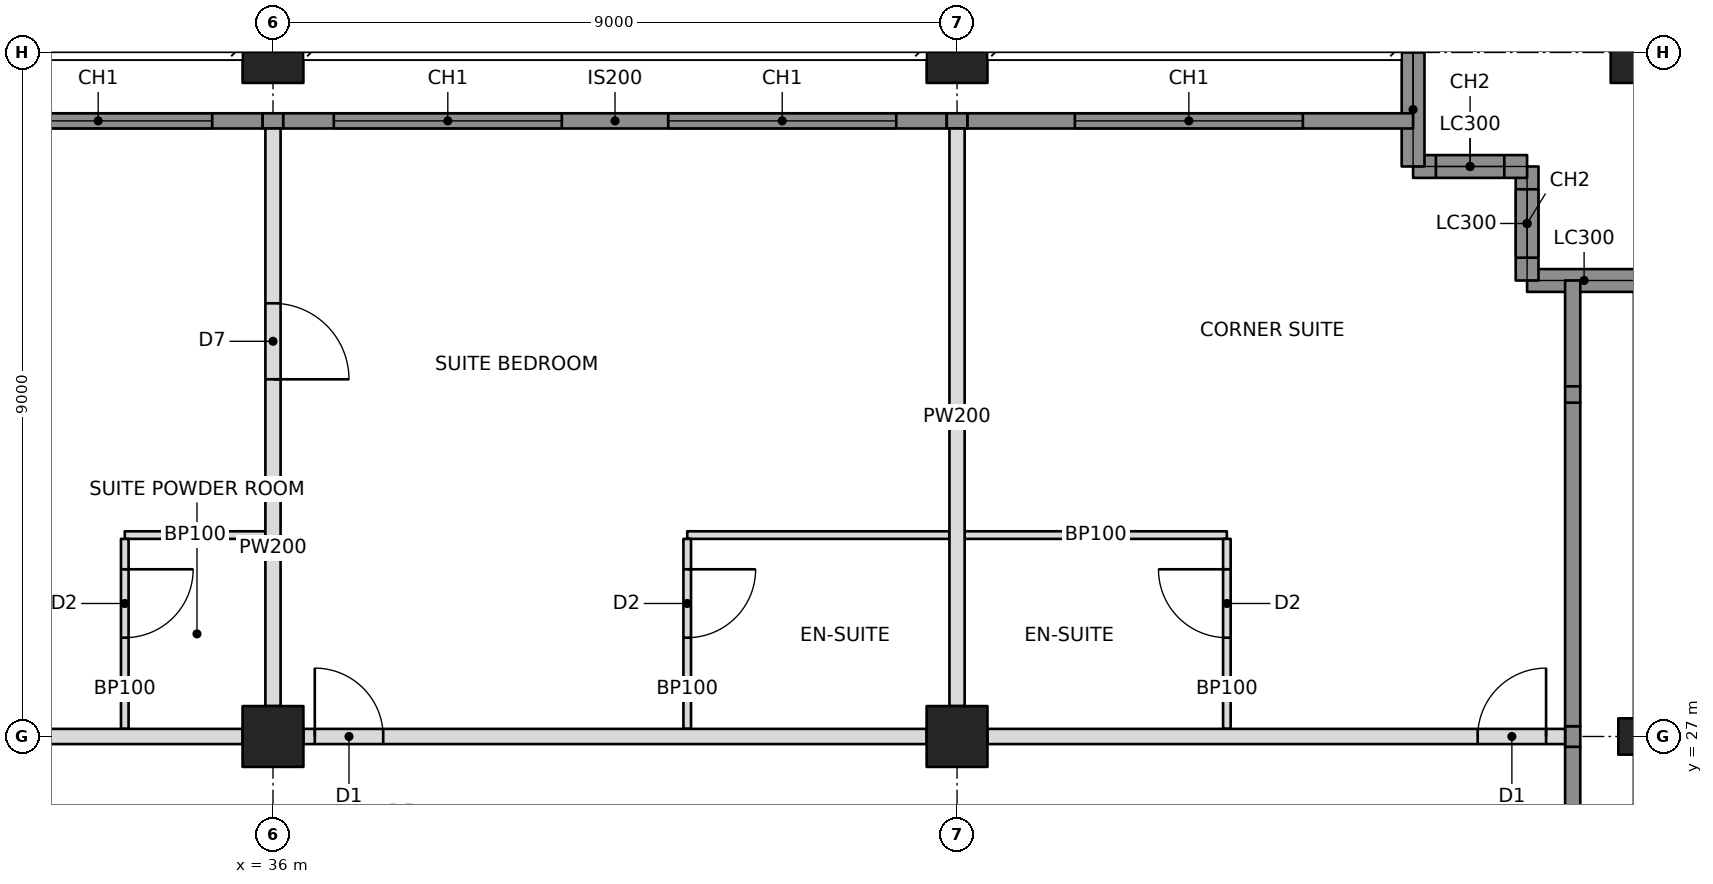
"""IFC4 building model, lengths in metres.
Left out: names, types, materials, properties, quantities, classifications, styles, units other than length and angle.
Written with IfcOpenShell. Run it as: python <this file> out.ifc"""

import sys

from ifc_helpers import new_model, si_unit, direction, frame, frame_2d, origin, origin_2d, place, context, subcontext, project, spatial, rectangle, hollow_rectangle, i_section, extrude, element, fill, save


model = new_model("IFC4")
c1 = context("Model", 3, precision=1e-05, world=origin(), true_north=direction((0.0, 1.0)))
c2 = subcontext(c1, "Body", "Model", "MODEL_VIEW")
j1 = project(units=[si_unit("LENGTHUNIT", "METRE"), si_unit("PLANEANGLEUNIT", "RADIAN")], contexts=[c1])
p1 = place(None, origin())
s1 = spatial("IfcSite", under=j1, at=p1, CompositionType="ELEMENT")
p2 = place(p1, origin())
s2 = spatial("IfcBuilding", under=s1, at=p2, CompositionType="ELEMENT")
p3 = place(p2, frame((0.0, 0.0, 28.0)))
s3 = spatial("IfcBuildingStorey", under=s2, at=p3, CompositionType="ELEMENT", Elevation=28.0)
for number, where, z_axis, x_axis in (
    (1, (36.0, 27.0, 0.0), (0.0, 0.0, 1.0), (1.0, 0.0, 0.0)),
    (2, (36.0, 36.0, 0.0), (0.0, 0.0, 1.0), (1.0, 0.0, 0.0)),
    (3, (45.0, 27.0, 0.0), (0.0, 0.0, 1.0), (0.0, 1.0, 0.0)),
    (4, (45.0, 36.0, 0.0), (0.0, 0.0, 1.0), (1.0, 0.0, 0.0)),
):
    element("IfcColumn", number, at=place(p3, frame(where, z_axis=z_axis, x_axis=x_axis)), inside=s3, PredefinedType="COLUMN", context=c2, shape_type="SweptSolid", body=[
        extrude(hollow_rectangle(XDim=0.8, YDim=0.8, WallThickness=0.1, at=origin_2d()), origin(), (0.0, 0.0, 1.0), 3.4),
    ])
p4 = place(p3, frame((54.0, 27.0, 0.0), z_axis=(0.0, 0.0, 1.0), x_axis=(0.0, 1.0, 0.0)))
e5 = element("IfcColumn", 5, at=p4, inside=s3, PredefinedType="COLUMN", context=c2, shape_type="SweptSolid", body=[
    extrude(i_section(OverallWidth=0.478, OverallDepth=0.599, WebThickness=0.1, FlangeThickness=0.14, at=origin_2d()), origin(), (0.0, 0.0, 1.0), 3.4),
])
p5 = place(p3, frame((54.0, 36.0, 0.0), z_axis=(0.0, 0.0, 1.0), x_axis=(1.0, 0.0, 0.0)))
e6 = element("IfcColumn", 6, at=p5, inside=s3, PredefinedType="COLUMN", context=c2, shape_type="SweptSolid", body=[
    extrude(hollow_rectangle(XDim=0.8, YDim=0.8, WallThickness=0.1, at=origin_2d()), origin(), (0.0, 0.0, 1.0), 3.4),
])
p6 = place(p3, frame((54.0, 33.0, 0.0), z_axis=(0.0, 0.0, 1.0), x_axis=(-1.0, 0.0, 0.0)))
e7 = element("IfcWall", 7, at=p6, inside=s3, PredefinedType="SOLIDWALL", context=c2, shape_type="SweptSolid", body=[
    extrude(rectangle(XDim=1.5, YDim=0.3, at=frame_2d((0.75, 0.0))), origin(), (0.0, 0.0, 1.0), 2.42),
])
p7 = place(p3, frame((52.5, 33.0, 0.0), z_axis=(0.0, 0.0, 1.0), x_axis=(0.0, 1.0, 0.0)))
e8 = element("IfcWall", 8, at=p7, inside=s3, PredefinedType="SOLIDWALL", context=c2, shape_type="SweptSolid", body=[
    extrude(rectangle(XDim=1.5, YDim=0.3, at=frame_2d((0.75, 0.0))), origin(), (0.0, 0.0, 1.0), 3.2),
])
p8 = place(p7, frame((0.3, 0.0, 0.6)))
e9 = element("IfcOpeningElement", 9, at=p8, cuts=e8, PredefinedType="OPENING", context=c2, shape_type="SweptSolid", body=[
    extrude(rectangle(XDim=0.9, YDim=2.2, at=frame_2d((0.45, 1.1))), frame((0.0, 0.16, 0.0), z_axis=(0.0, -1.0, 0.0), x_axis=(1.0, 0.0, 0.0)), (0.0, 0.0, 1.0), 0.32),
])
p9 = place(p3, frame((52.5, 34.5, 0.0), z_axis=(0.0, 0.0, 1.0), x_axis=(-1.0, 0.0, 0.0)))
e10 = element("IfcWall", 10, at=p9, inside=s3, PredefinedType="SOLIDWALL", context=c2, shape_type="SweptSolid", body=[
    extrude(rectangle(XDim=1.5, YDim=0.3, at=frame_2d((0.75, 0.0))), origin(), (0.0, 0.0, 1.0), 3.2),
])
p10 = place(p9, frame((0.3, 0.0, 0.6)))
e11 = element("IfcOpeningElement", 11, at=p10, cuts=e10, PredefinedType="OPENING", context=c2, shape_type="SweptSolid", body=[
    extrude(rectangle(XDim=0.9, YDim=2.2, at=frame_2d((0.45, 1.1))), frame((0.0, 0.16, 0.0), z_axis=(0.0, -1.0, 0.0), x_axis=(1.0, 0.0, 0.0)), (0.0, 0.0, 1.0), 0.32),
])
p11 = place(p3, frame((51.0, 34.5, 0.0), z_axis=(0.0, 0.0, 1.0), x_axis=(0.0, 1.0, 0.0)))
e12 = element("IfcWall", 12, at=p11, inside=s3, PredefinedType="SOLIDWALL", context=c2, shape_type="SweptSolid", body=[
    extrude(rectangle(XDim=1.5, YDim=0.3, at=frame_2d((0.75, 0.0))), origin(), (0.0, 0.0, 1.0), 2.42),
])
p12 = place(p3, frame((27.4, 27.0, 0.0), z_axis=(0.0, 0.0, 1.0), x_axis=(1.0, 0.0, 0.0)))
e13 = element("IfcWall", 13, at=p12, inside=s3, PredefinedType="PARTITIONING", context=c2, shape_type="SweptSolid", body=[
    extrude(rectangle(XDim=8.2, YDim=0.2, at=frame_2d((4.1, 0.0))), origin(), (0.0, 0.0, 1.0), 2.405),
])
p13 = place(p12, frame((0.15, 0.0, 0.0)))
e14 = element("IfcOpeningElement", 14, at=p13, cuts=e13, PredefinedType="OPENING", context=c2, shape_type="SweptSolid", body=[
    extrude(rectangle(XDim=0.9, YDim=2.1, at=frame_2d((0.45, 1.05))), frame((0.0, 0.11, 0.0), z_axis=(0.0, -1.0, 0.0), x_axis=(1.0, 0.0, 0.0)), (0.0, 0.0, 1.0), 0.22),
])
p14 = place(p3, frame((36.4, 27.0, 0.0), z_axis=(0.0, 0.0, 1.0), x_axis=(1.0, 0.0, 0.0)))
e15 = element("IfcWall", 15, at=p14, inside=s3, PredefinedType="PARTITIONING", context=c2, shape_type="SweptSolid", body=[
    extrude(rectangle(XDim=8.2, YDim=0.2, at=frame_2d((4.1, 0.0))), origin(), (0.0, 0.0, 1.0), 2.438),
])
p15 = place(p14, frame((0.15, 0.0, 0.0)))
e16 = element("IfcOpeningElement", 16, at=p15, cuts=e15, PredefinedType="OPENING", context=c2, shape_type="SweptSolid", body=[
    extrude(rectangle(XDim=0.9, YDim=2.1, at=frame_2d((0.45, 1.05))), frame((0.0, 0.11, 0.0), z_axis=(0.0, -1.0, 0.0), x_axis=(1.0, 0.0, 0.0)), (0.0, 0.0, 1.0), 0.22),
])
p16 = place(p3, frame((45.4, 27.0, 0.0), z_axis=(0.0, 0.0, 1.0), x_axis=(1.0, 0.0, 0.0)))
e17 = element("IfcWall", 17, at=p16, inside=s3, PredefinedType="PARTITIONING", context=c2, shape_type="SweptSolid", body=[
    extrude(rectangle(XDim=7.6, YDim=0.2, at=frame_2d((3.8, 0.0))), origin(), (0.0, 0.0, 1.0), 2.438),
])
p17 = place(p16, frame((6.45, 0.0, 0.0)))
e18 = element("IfcOpeningElement", 18, at=p17, cuts=e17, PredefinedType="OPENING", context=c2, shape_type="SweptSolid", body=[
    extrude(rectangle(XDim=0.9, YDim=2.1, at=frame_2d((0.45, 1.05))), frame((0.0, 0.11, 0.0), z_axis=(0.0, -1.0, 0.0), x_axis=(1.0, 0.0, 0.0)), (0.0, 0.0, 1.0), 0.22),
])
p18 = place(p3, frame((36.0, 27.4, 0.0), z_axis=(0.0, 0.0, 1.0), x_axis=(0.0, 1.0, 0.0)))
e19 = element("IfcWall", 19, at=p18, inside=s3, PredefinedType="PARTITIONING", context=c2, shape_type="SweptSolid", body=[
    extrude(rectangle(XDim=7.6, YDim=0.2, at=frame_2d((3.8, 0.0))), origin(), (0.0, 0.0, 1.0), 2.438),
])
p19 = place(p18, frame((4.3, 0.0, 0.0)))
e20 = element("IfcOpeningElement", 20, at=p19, cuts=e19, PredefinedType="OPENING", context=c2, shape_type="SweptSolid", body=[
    extrude(rectangle(XDim=1.0, YDim=2.1, at=frame_2d((0.5, 1.05))), frame((0.0, 0.11, 0.0), z_axis=(0.0, -1.0, 0.0), x_axis=(1.0, 0.0, 0.0)), (0.0, 0.0, 1.0), 0.22),
])
p20 = place(p3, frame((45.0, 27.4, 0.0), z_axis=(0.0, 0.0, 1.0), x_axis=(0.0, 1.0, 0.0)))
e21 = element("IfcWall", 21, at=p20, inside=s3, PredefinedType="PARTITIONING", context=c2, shape_type="SweptSolid", body=[
    extrude(rectangle(XDim=7.6, YDim=0.2, at=frame_2d((3.8, 0.0))), origin(), (0.0, 0.0, 1.0), 2.438),
])
p21 = place(p3, frame((34.05, 29.65, 0.0), z_axis=(0.0, 0.0, 1.0), x_axis=(1.0, 0.0, 0.0)))
e22 = element("IfcWall", 22, at=p21, inside=s3, PredefinedType="PARTITIONING", context=c2, shape_type="SweptSolid", body=[
    extrude(rectangle(XDim=1.85, YDim=0.1, at=frame_2d((0.925, 0.0))), origin(), (0.0, 0.0, 1.0), 2.438),
])
p22 = place(p3, frame((34.05, 27.1, 0.0), z_axis=(0.0, 0.0, 1.0), x_axis=(0.0, 1.0, 0.0)))
e23 = element("IfcWall", 23, at=p22, inside=s3, PredefinedType="PARTITIONING", context=c2, shape_type="SweptSolid", body=[
    extrude(rectangle(XDim=2.5, YDim=0.1, at=frame_2d((1.25, 0.0))), origin(), (0.0, 0.0, 1.0), 2.404),
])
p23 = place(p22, frame((1.2, 0.0, 0.0)))
e24 = element("IfcOpeningElement", 24, at=p23, cuts=e23, PredefinedType="OPENING", context=c2, shape_type="SweptSolid", body=[
    extrude(rectangle(XDim=0.9, YDim=2.1, at=frame_2d((0.45, 1.05))), frame((0.0, 0.06, 0.0), z_axis=(0.0, -1.0, 0.0), x_axis=(1.0, 0.0, 0.0)), (0.0, 0.0, 1.0), 0.12),
])
p24 = place(p3, frame((41.45, 29.65, 0.0), z_axis=(0.0, 0.0, 1.0), x_axis=(1.0, 0.0, 0.0)))
e25 = element("IfcWall", 25, at=p24, inside=s3, PredefinedType="PARTITIONING", context=c2, shape_type="SweptSolid", body=[
    extrude(rectangle(XDim=3.45, YDim=0.1, at=frame_2d((1.725, 0.0))), origin(), (0.0, 0.0, 1.0), 2.438),
])
p25 = place(p3, frame((41.45, 27.1, 0.0), z_axis=(0.0, 0.0, 1.0), x_axis=(0.0, 1.0, 0.0)))
e26 = element("IfcWall", 26, at=p25, inside=s3, PredefinedType="PARTITIONING", context=c2, shape_type="SweptSolid", body=[
    extrude(rectangle(XDim=2.5, YDim=0.1, at=frame_2d((1.25, 0.0))), origin(), (0.0, 0.0, 1.0), 2.438),
])
p26 = place(p25, frame((1.2, 0.0, 0.0)))
e27 = element("IfcOpeningElement", 27, at=p26, cuts=e26, PredefinedType="OPENING", context=c2, shape_type="SweptSolid", body=[
    extrude(rectangle(XDim=0.9, YDim=2.1, at=frame_2d((0.45, 1.05))), frame((0.0, 0.06, 0.0), z_axis=(0.0, -1.0, 0.0), x_axis=(1.0, 0.0, 0.0)), (0.0, 0.0, 1.0), 0.12),
])
p27 = place(p3, frame((45.1, 29.65, 0.0), z_axis=(0.0, 0.0, 1.0), x_axis=(1.0, 0.0, 0.0)))
e28 = element("IfcWall", 28, at=p27, inside=s3, PredefinedType="PARTITIONING", context=c2, shape_type="SweptSolid", body=[
    extrude(rectangle(XDim=3.45, YDim=0.1, at=frame_2d((1.725, 0.0))), origin(), (0.0, 0.0, 1.0), 2.438),
])
p28 = place(p3, frame((48.55, 27.1, 0.0), z_axis=(0.0, 0.0, 1.0), x_axis=(0.0, 1.0, 0.0)))
e29 = element("IfcWall", 29, at=p28, inside=s3, PredefinedType="PARTITIONING", context=c2, shape_type="SweptSolid", body=[
    extrude(rectangle(XDim=2.5, YDim=0.1, at=frame_2d((1.25, 0.0))), origin(), (0.0, 0.0, 1.0), 2.438),
])
p29 = place(p28, frame((1.2, 0.0, 0.0)))
e30 = element("IfcOpeningElement", 30, at=p29, cuts=e29, PredefinedType="OPENING", context=c2, shape_type="SweptSolid", body=[
    extrude(rectangle(XDim=0.9, YDim=2.1, at=frame_2d((0.45, 1.05))), frame((0.0, 0.06, 0.0), z_axis=(0.0, -1.0, 0.0), x_axis=(1.0, 0.0, 0.0)), (0.0, 0.0, 1.0), 0.12),
])
p30 = place(p3, frame((27.194, 35.1, 0.0), z_axis=(0.0, 0.0, 1.0), x_axis=(1.0, 0.0, 0.0)))
e31 = element("IfcWall", 31, at=p30, inside=s3, PredefinedType="SOLIDWALL", context=c2, shape_type="SweptSolid", body=[
    extrude(rectangle(XDim=8.671, YDim=0.2, at=frame_2d((4.335, 0.0))), origin(), (0.0, 0.0, 1.0), 3.2),
])
p31 = place(p30, frame((0.606, 0.0, 0.6)))
e32 = element("IfcOpeningElement", 32, at=p31, cuts=e31, PredefinedType="OPENING", context=c2, shape_type="SweptSolid", body=[
    extrude(rectangle(XDim=3.0, YDim=2.2, at=frame_2d((1.5, 1.1))), frame((0.0, 0.11, 0.0), z_axis=(0.0, -1.0, 0.0), x_axis=(1.0, 0.0, 0.0)), (0.0, 0.0, 1.0), 0.22),
])
p32 = place(p30, frame((5.006, 0.0, 0.6)))
e33 = element("IfcOpeningElement", 33, at=p32, cuts=e31, PredefinedType="OPENING", context=c2, shape_type="SweptSolid", body=[
    extrude(rectangle(XDim=3.0, YDim=2.2, at=frame_2d((1.5, 1.1))), frame((0.0, 0.11, 0.0), z_axis=(0.0, -1.0, 0.0), x_axis=(1.0, 0.0, 0.0)), (0.0, 0.0, 1.0), 0.22),
])
p33 = place(p3, frame((35.865, 35.1, 0.0), z_axis=(0.0, 0.0, 1.0), x_axis=(1.0, 0.0, 0.0)))
e34 = element("IfcWall", 34, at=p33, inside=s3, PredefinedType="SOLIDWALL", context=c2, shape_type="SweptSolid", body=[
    extrude(rectangle(XDim=0.271, YDim=0.2, at=frame_2d((0.135, 0.0))), origin(), (0.0, 0.0, 1.0), 2.438),
])
p34 = place(p3, frame((36.135, 35.1, 0.0), z_axis=(0.0, 0.0, 1.0), x_axis=(1.0, 0.0, 0.0)))
e35 = element("IfcWall", 35, at=p34, inside=s3, PredefinedType="SOLIDWALL", context=c2, shape_type="SweptSolid", body=[
    extrude(rectangle(XDim=8.729, YDim=0.2, at=frame_2d((4.365, 0.0))), origin(), (0.0, 0.0, 1.0), 3.2),
])
p35 = place(p34, frame((0.665, 0.0, 0.6)))
e36 = element("IfcOpeningElement", 36, at=p35, cuts=e35, PredefinedType="OPENING", context=c2, shape_type="SweptSolid", body=[
    extrude(rectangle(XDim=3.0, YDim=2.2, at=frame_2d((1.5, 1.1))), frame((0.0, 0.11, 0.0), z_axis=(0.0, -1.0, 0.0), x_axis=(1.0, 0.0, 0.0)), (0.0, 0.0, 1.0), 0.22),
])
p36 = place(p34, frame((5.065, 0.0, 0.6)))
e37 = element("IfcOpeningElement", 37, at=p36, cuts=e35, PredefinedType="OPENING", context=c2, shape_type="SweptSolid", body=[
    extrude(rectangle(XDim=3.0, YDim=2.2, at=frame_2d((1.5, 1.1))), frame((0.0, 0.11, 0.0), z_axis=(0.0, -1.0, 0.0), x_axis=(1.0, 0.0, 0.0)), (0.0, 0.0, 1.0), 0.22),
])
p37 = place(p3, frame((44.865, 35.1, 0.0), z_axis=(0.0, 0.0, 1.0), x_axis=(1.0, 0.0, 0.0)))
e38 = element("IfcWall", 38, at=p37, inside=s3, PredefinedType="SOLIDWALL", context=c2, shape_type="SweptSolid", body=[
    extrude(rectangle(XDim=0.271, YDim=0.2, at=frame_2d((0.135, 0.0))), origin(), (0.0, 0.0, 1.0), 2.438),
])
p38 = place(p3, frame((45.135, 35.1, 0.0), z_axis=(0.0, 0.0, 1.0), x_axis=(1.0, 0.0, 0.0)))
e39 = element("IfcWall", 39, at=p38, inside=s3, PredefinedType="SOLIDWALL", context=c2, shape_type="SweptSolid", body=[
    extrude(rectangle(XDim=5.865, YDim=0.2, at=frame_2d((2.932, 0.0))), origin(), (0.0, 0.0, 1.0), 3.2),
])
p39 = place(p38, frame((1.415, 0.0, 0.6)))
e40 = element("IfcOpeningElement", 40, at=p39, cuts=e39, PredefinedType="OPENING", context=c2, shape_type="SweptSolid", body=[
    extrude(rectangle(XDim=3.0, YDim=2.2, at=frame_2d((1.5, 1.1))), frame((0.0, 0.11, 0.0), z_axis=(0.0, -1.0, 0.0), x_axis=(1.0, 0.0, 0.0)), (0.0, 0.0, 1.0), 0.22),
])
p40 = place(p3, frame((53.1, 18.135, 0.0), z_axis=(0.0, 0.0, 1.0), x_axis=(0.0, 1.0, 0.0)))
e41 = element("IfcWall", 41, at=p40, inside=s3, PredefinedType="SOLIDWALL", context=c2, shape_type="SweptSolid", body=[
    extrude(rectangle(XDim=8.729, YDim=0.2, at=frame_2d((4.365, 0.0))), origin(), (0.0, 0.0, 1.0), 3.2),
])
p41 = place(p40, frame((0.215, 0.0, 0.6)))
e42 = element("IfcOpeningElement", 42, at=p41, cuts=e41, PredefinedType="OPENING", context=c2, shape_type="SweptSolid", body=[
    extrude(rectangle(XDim=3.0, YDim=2.2, at=frame_2d((1.5, 1.1))), frame((0.0, 0.11, 0.0), z_axis=(0.0, -1.0, 0.0), x_axis=(1.0, 0.0, 0.0)), (0.0, 0.0, 1.0), 0.22),
])
p42 = place(p40, frame((3.715, 0.0, 0.6)))
e43 = element("IfcOpeningElement", 43, at=p42, cuts=e41, PredefinedType="OPENING", context=c2, shape_type="SweptSolid", body=[
    extrude(rectangle(XDim=3.0, YDim=2.2, at=frame_2d((1.5, 1.1))), frame((0.0, 0.11, 0.0), z_axis=(0.0, -1.0, 0.0), x_axis=(1.0, 0.0, 0.0)), (0.0, 0.0, 1.0), 0.22),
])
p43 = place(p3, frame((53.1, 26.865, 0.0), z_axis=(0.0, 0.0, 1.0), x_axis=(0.0, 1.0, 0.0)))
e44 = element("IfcWall", 44, at=p43, inside=s3, PredefinedType="SOLIDWALL", context=c2, shape_type="SweptSolid", body=[
    extrude(rectangle(XDim=0.271, YDim=0.2, at=frame_2d((0.135, 0.0))), origin(), (0.0, 0.0, 1.0), 2.438),
])
p44 = place(p3, frame((53.1, 27.135, 0.0), z_axis=(0.0, 0.0, 1.0), x_axis=(0.0, 1.0, 0.0)))
e45 = element("IfcWall", 45, at=p44, inside=s3, PredefinedType="SOLIDWALL", context=c2, shape_type="SweptSolid", body=[
    extrude(rectangle(XDim=4.257, YDim=0.2, at=frame_2d((2.129, 0.0))), origin(), (0.0, 0.0, 1.0), 3.2),
])
p45 = place(p3, frame((53.1, 31.393, 0.0), z_axis=(0.0, 0.0, 1.0), x_axis=(0.0, 1.0, 0.0)))
e46 = element("IfcWall", 46, at=p45, inside=s3, PredefinedType="SOLIDWALL", context=c2, shape_type="SweptSolid", body=[
    extrude(rectangle(XDim=0.215, YDim=0.2, at=frame_2d((0.107, 0.0))), origin(), (0.0, 0.0, 1.0), 2.661),
])
p46 = place(p3, frame((53.1, 31.607, 0.0), z_axis=(0.0, 0.0, 1.0), x_axis=(0.0, 1.0, 0.0)))
e47 = element("IfcWall", 47, at=p46, inside=s3, PredefinedType="SOLIDWALL", context=c2, shape_type="SweptSolid", body=[
    extrude(rectangle(XDim=1.393, YDim=0.2, at=frame_2d((0.696, 0.0))), origin(), (0.0, 0.0, 1.0), 3.2),
])
p47 = place(p8, origin())
e48 = element("IfcWindow", 48, at=p47, inside=s3, PartitioningType="SINGLE_PANEL", PredefinedType="WINDOW", context=c2, shape_type="SweptSolid", body=[
    extrude(rectangle(XDim=0.9, YDim=2.2, at=frame_2d((0.45, 1.1))), frame((0.0, 0.03, 0.0), z_axis=(0.0, -1.0, 0.0), x_axis=(1.0, 0.0, 0.0)), (0.0, 0.0, 1.0), 0.06),
])
fill(e9, e48)
p48 = place(p10, origin())
e49 = element("IfcWindow", 49, at=p48, inside=s3, PartitioningType="SINGLE_PANEL", PredefinedType="WINDOW", context=c2, shape_type="SweptSolid", body=[
    extrude(rectangle(XDim=0.9, YDim=2.2, at=frame_2d((0.45, 1.1))), frame((0.0, 0.03, 0.0), z_axis=(0.0, -1.0, 0.0), x_axis=(1.0, 0.0, 0.0)), (0.0, 0.0, 1.0), 0.06),
])
fill(e11, e49)
p49 = place(p32, origin())
e50 = element("IfcWindow", 50, at=p49, inside=s3, PartitioningType="TRIPLE_PANEL_VERTICAL", PredefinedType="WINDOW", context=c2, shape_type="SweptSolid", body=[
    extrude(rectangle(XDim=3.0, YDim=2.2, at=frame_2d((1.5, 1.1))), frame((0.0, 0.03, 0.0), z_axis=(0.0, -1.0, 0.0), x_axis=(1.0, 0.0, 0.0)), (0.0, 0.0, 1.0), 0.06),
])
fill(e33, e50)
p50 = place(p35, origin())
e51 = element("IfcWindow", 51, at=p50, inside=s3, PartitioningType="TRIPLE_PANEL_VERTICAL", PredefinedType="WINDOW", context=c2, shape_type="SweptSolid", body=[
    extrude(rectangle(XDim=3.0, YDim=2.2, at=frame_2d((1.5, 1.1))), frame((0.0, 0.03, 0.0), z_axis=(0.0, -1.0, 0.0), x_axis=(1.0, 0.0, 0.0)), (0.0, 0.0, 1.0), 0.06),
])
fill(e36, e51)
p51 = place(p36, origin())
e52 = element("IfcWindow", 52, at=p51, inside=s3, PartitioningType="TRIPLE_PANEL_VERTICAL", PredefinedType="WINDOW", context=c2, shape_type="SweptSolid", body=[
    extrude(rectangle(XDim=3.0, YDim=2.2, at=frame_2d((1.5, 1.1))), frame((0.0, 0.03, 0.0), z_axis=(0.0, -1.0, 0.0), x_axis=(1.0, 0.0, 0.0)), (0.0, 0.0, 1.0), 0.06),
])
fill(e37, e52)
p52 = place(p39, origin())
e53 = element("IfcWindow", 53, at=p52, inside=s3, PartitioningType="TRIPLE_PANEL_VERTICAL", PredefinedType="WINDOW", context=c2, shape_type="SweptSolid", body=[
    extrude(rectangle(XDim=3.0, YDim=2.2, at=frame_2d((1.5, 1.1))), frame((0.0, 0.03, 0.0), z_axis=(0.0, -1.0, 0.0), x_axis=(1.0, 0.0, 0.0)), (0.0, 0.0, 1.0), 0.06),
])
fill(e40, e53)
p53 = place(p19, frame((1.0, 0.0, 0.0), z_axis=(0.0, 0.0, 1.0), x_axis=(-1.0, 0.0, 0.0)))
e54 = element("IfcDoor", 54, at=p53, inside=s3, OperationType="SINGLE_SWING_RIGHT", PredefinedType="DOOR", context=c2, shape_type="SweptSolid", body=[
    extrude(rectangle(XDim=1.0, YDim=2.1, at=frame_2d((0.5, 1.05))), frame((0.0, 0.025, 0.0), z_axis=(0.0, -1.0, 0.0), x_axis=(1.0, 0.0, 0.0)), (0.0, 0.0, 1.0), 0.05),
])
fill(e20, e54)
p54 = place(p23, frame((0.9, 0.0, 0.0), z_axis=(0.0, 0.0, 1.0), x_axis=(-1.0, 0.0, 0.0)))
e55 = element("IfcDoor", 55, at=p54, inside=s3, OperationType="SINGLE_SWING_LEFT", PredefinedType="DOOR", context=c2, shape_type="SweptSolid", body=[
    extrude(rectangle(XDim=0.9, YDim=2.1, at=frame_2d((0.45, 1.05))), frame((0.0, 0.025, 0.0), z_axis=(0.0, -1.0, 0.0), x_axis=(1.0, 0.0, 0.0)), (0.0, 0.0, 1.0), 0.05),
])
fill(e24, e55)
p55 = place(p26, frame((0.9, 0.0, 0.0), z_axis=(0.0, 0.0, 1.0), x_axis=(-1.0, 0.0, 0.0)))
e56 = element("IfcDoor", 56, at=p55, inside=s3, OperationType="SINGLE_SWING_LEFT", PredefinedType="DOOR", context=c2, shape_type="SweptSolid", body=[
    extrude(rectangle(XDim=0.9, YDim=2.1, at=frame_2d((0.45, 1.05))), frame((0.0, 0.025, 0.0), z_axis=(0.0, -1.0, 0.0), x_axis=(1.0, 0.0, 0.0)), (0.0, 0.0, 1.0), 0.05),
])
fill(e27, e56)
p56 = place(p15, origin())
e57 = element("IfcDoor", 57, at=p56, inside=s3, OperationType="SINGLE_SWING_LEFT", PredefinedType="DOOR", context=c2, shape_type="SweptSolid", body=[
    extrude(rectangle(XDim=0.9, YDim=2.1, at=frame_2d((0.45, 1.05))), frame((0.0, 0.025, 0.0), z_axis=(0.0, -1.0, 0.0), x_axis=(1.0, 0.0, 0.0)), (0.0, 0.0, 1.0), 0.05),
])
fill(e16, e57)
p57 = place(p29, origin())
e58 = element("IfcDoor", 58, at=p57, inside=s3, OperationType="SINGLE_SWING_RIGHT", PredefinedType="DOOR", context=c2, shape_type="SweptSolid", body=[
    extrude(rectangle(XDim=0.9, YDim=2.1, at=frame_2d((0.45, 1.05))), frame((0.0, 0.025, 0.0), z_axis=(0.0, -1.0, 0.0), x_axis=(1.0, 0.0, 0.0)), (0.0, 0.0, 1.0), 0.05),
])
fill(e30, e58)
p58 = place(p17, origin())
e59 = element("IfcDoor", 59, at=p58, inside=s3, OperationType="SINGLE_SWING_RIGHT", PredefinedType="DOOR", context=c2, shape_type="SweptSolid", body=[
    extrude(rectangle(XDim=0.9, YDim=2.1, at=frame_2d((0.45, 1.05))), frame((0.0, 0.025, 0.0), z_axis=(0.0, -1.0, 0.0), x_axis=(1.0, 0.0, 0.0)), (0.0, 0.0, 1.0), 0.05),
])
fill(e18, e59)
save(model, sys.argv[1])
